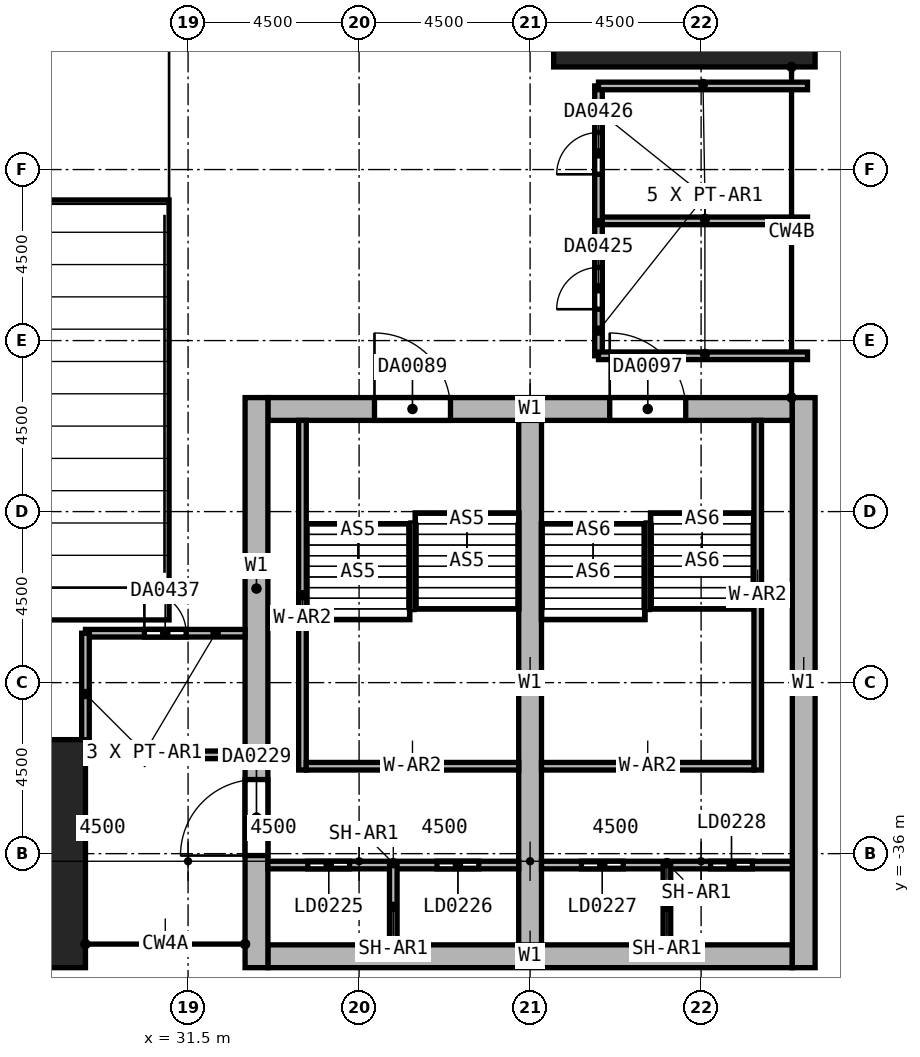
"""IFC4 building model, lengths in metres.
Left out: names, types, materials, properties, quantities, classifications, styles, units other than length and angle.
Written with IfcOpenShell. Run it as: python <this file> out.ifc"""

import sys

from ifc_helpers import new_model, si_unit, direction, frame, frame_2d, origin, origin_2d, place, context, subcontext, project, spatial, rectangle, extrude, element, fill, save


model = new_model("IFC4")
c1 = context("Model", 3, precision=1e-05, world=origin(), true_north=direction((0.0, 1.0)))
c2 = subcontext(c1, "Body", "Model", "MODEL_VIEW")
j1 = project(units=[si_unit("LENGTHUNIT", "METRE"), si_unit("PLANEANGLEUNIT", "RADIAN")], contexts=[c1])
p1 = place(None, origin())
s1 = spatial("IfcSite", under=j1, at=p1, CompositionType="ELEMENT")
p2 = place(p1, origin())
s2 = spatial("IfcBuilding", under=s1, at=p2, CompositionType="ELEMENT")
p3 = place(p2, frame((0.0, 0.0, 31.0)))
s3 = spatial("IfcBuildingStorey", under=s2, at=p3, CompositionType="ELEMENT", Elevation=31.0)
p4 = place(p3, frame((27.0, -36.0, 0.0), z_axis=(0.0, 0.0, 1.0), x_axis=(1.0, 0.0, 0.0)))
e1 = element("IfcColumn", 1, at=p4, inside=s3, PredefinedType="COLUMN", context=c2, shape_type="SweptSolid", body=[
    extrude(rectangle(XDim=3.6, YDim=6.0, at=origin_2d()), origin(), (0.0, 0.0, 1.0), 6.0),
])
p5 = place(p3, frame((44.56, -13.5, 0.0), z_axis=(0.0, 0.0, 1.0), x_axis=(0.0, 1.0, 0.0)))
e2 = element("IfcColumn", 2, at=p5, inside=s3, PredefinedType="COLUMN", context=c2, shape_type="SweptSolid", body=[
    extrude(rectangle(XDim=3.6, YDim=6.88, at=origin_2d()), origin(), (0.0, 0.0, 1.0), 6.0),
])
p6 = place(p3, frame((33.6, -24.3, 0.0), z_axis=(0.0, 0.0, 1.0), x_axis=(1.0, 0.0, 0.0)))
e3 = element("IfcWall", 3, at=p6, inside=s3, PredefinedType="SHEAR", context=c2, shape_type="SweptSolid", body=[
    extrude(rectangle(XDim=13.8, YDim=0.6, at=frame_2d((6.9, 0.0))), origin(), (0.0, 0.0, 1.0), 6.0),
])
p7 = place(p6, frame((2.805, 0.0, 0.0)))
e4 = element("IfcOpeningElement", 4, at=p7, cuts=e3, PredefinedType="OPENING", context=c2, shape_type="SweptSolid", body=[
    extrude(rectangle(XDim=2.0, YDim=2.4, at=frame_2d((1.0, 1.2))), frame((0.0, 0.3, 0.0), z_axis=(0.0, -1.0, 0.0), x_axis=(1.0, 0.0, 0.0)), (0.0, 0.0, 1.0), 0.6),
])
p8 = place(p6, frame((8.995, 0.0, 0.0)))
e5 = element("IfcOpeningElement", 5, at=p8, cuts=e3, PredefinedType="OPENING", context=c2, shape_type="SweptSolid", body=[
    extrude(rectangle(XDim=2.0, YDim=2.4, at=frame_2d((1.0, 1.2))), frame((0.0, 0.3, 0.0), z_axis=(0.0, -1.0, 0.0), x_axis=(1.0, 0.0, 0.0)), (0.0, 0.0, 1.0), 0.6),
])
p9 = place(p3, frame((33.6, -38.7, 0.0), z_axis=(0.0, 0.0, 1.0), x_axis=(1.0, 0.0, 0.0)))
e6 = element("IfcWall", 6, at=p9, inside=s3, PredefinedType="SHEAR", context=c2, shape_type="SweptSolid", body=[
    extrude(rectangle(XDim=13.8, YDim=0.6, at=frame_2d((6.9, 0.0))), origin(), (0.0, 0.0, 1.0), 6.0),
])
p10 = place(p3, frame((33.3, -39.0, 0.0), z_axis=(0.0, 0.0, 1.0), x_axis=(0.0, 1.0, 0.0)))
e7 = element("IfcWall", 7, at=p10, inside=s3, PredefinedType="SHEAR", context=c2, shape_type="SweptSolid", body=[
    extrude(rectangle(XDim=15.0, YDim=0.6, at=frame_2d((7.5, 0.0))), origin(), (0.0, 0.0, 1.0), 6.0),
])
p11 = place(p10, frame((2.95, 0.0, 0.0)))
e8 = element("IfcOpeningElement", 8, at=p11, cuts=e7, PredefinedType="OPENING", context=c2, shape_type="SweptSolid", body=[
    extrude(rectangle(XDim=2.0, YDim=2.4, at=frame_2d((1.0, 1.2))), frame((0.0, 0.3, 0.0), z_axis=(0.0, -1.0, 0.0), x_axis=(1.0, 0.0, 0.0)), (0.0, 0.0, 1.0), 0.6),
])
p12 = place(p3, frame((47.7, -39.0, 0.0), z_axis=(0.0, 0.0, 1.0), x_axis=(0.0, 1.0, 0.0)))
e9 = element("IfcWall", 9, at=p12, inside=s3, PredefinedType="SHEAR", context=c2, shape_type="SweptSolid", body=[
    extrude(rectangle(XDim=15.0, YDim=0.6, at=frame_2d((7.5, 0.0))), origin(), (0.0, 0.0, 1.0), 6.0),
])
p13 = place(p3, frame((40.5, -38.4, 0.0), z_axis=(0.0, 0.0, 1.0), x_axis=(0.0, 1.0, 0.0)))
e10 = element("IfcWall", 10, at=p13, inside=s3, PredefinedType="SHEAR", context=c2, shape_type="SweptSolid", body=[
    extrude(rectangle(XDim=13.8, YDim=0.6, at=frame_2d((6.9, 0.0))), origin(), (0.0, 0.0, 1.0), 6.0),
])
p14 = place(p3, frame((34.51, -33.8, 0.0), z_axis=(0.0, 0.0, 1.0), x_axis=(0.0, 1.0, 0.0)))
e11 = element("IfcWall", 11, at=p14, inside=s3, PredefinedType="SOLIDWALL", context=c2, shape_type="SweptSolid", body=[
    extrude(rectangle(XDim=9.2, YDim=0.2, at=frame_2d((4.6, 0.0))), origin(), (0.0, 0.0, 1.0), 6.0),
])
p15 = place(p3, frame((34.61, -33.7, 0.0), z_axis=(0.0, 0.0, 1.0), x_axis=(1.0, 0.0, 0.0)))
e12 = element("IfcWall", 12, at=p15, inside=s3, PredefinedType="SOLIDWALL", context=c2, shape_type="SweptSolid", body=[
    extrude(rectangle(XDim=5.59, YDim=0.2, at=frame_2d((2.795, 0.0))), origin(), (0.0, 0.0, 1.0), 6.0),
])
p16 = place(p3, frame((46.49, -33.8, 0.0), z_axis=(0.0, 0.0, 1.0), x_axis=(0.0, 1.0, 0.0)))
e13 = element("IfcWall", 13, at=p16, inside=s3, PredefinedType="SOLIDWALL", context=c2, shape_type="SweptSolid", body=[
    extrude(rectangle(XDim=9.2, YDim=0.2, at=frame_2d((4.6, 0.0))), origin(), (0.0, 0.0, 1.0), 6.0),
])
p17 = place(p3, frame((40.8, -33.7, 0.0), z_axis=(0.0, 0.0, 1.0), x_axis=(1.0, 0.0, 0.0)))
e14 = element("IfcWall", 14, at=p17, inside=s3, PredefinedType="SOLIDWALL", context=c2, shape_type="SweptSolid", body=[
    extrude(rectangle(XDim=5.59, YDim=0.2, at=frame_2d((2.795, 0.0))), origin(), (0.0, 0.0, 1.0), 6.0),
])
p18 = place(p3, frame((33.6, -36.3, 0.0), z_axis=(0.0, 0.0, 1.0), x_axis=(1.0, 0.0, 0.0)))
e15 = element("IfcWall", 15, at=p18, inside=s3, PredefinedType="SHEAR", context=c2, shape_type="SweptSolid", body=[
    extrude(rectangle(XDim=6.6, YDim=0.2, at=frame_2d((3.3, 0.0))), origin(), (0.0, 0.0, 1.0), 6.0),
])
p19 = place(p18, frame((1.05, 0.0, 0.0)))
e16 = element("IfcOpeningElement", 16, at=p19, cuts=e15, PredefinedType="OPENING", context=c2, shape_type="SweptSolid", body=[
    extrude(rectangle(XDim=1.1, YDim=2.4, at=frame_2d((0.55, 1.2))), frame((0.0, 0.1, 0.0), z_axis=(0.0, -1.0, 0.0), x_axis=(1.0, 0.0, 0.0)), (0.0, 0.0, 1.0), 0.2),
])
p20 = place(p18, frame((4.45, 0.0, 0.0)))
e17 = element("IfcOpeningElement", 17, at=p20, cuts=e15, PredefinedType="OPENING", context=c2, shape_type="SweptSolid", body=[
    extrude(rectangle(XDim=1.1, YDim=2.4, at=frame_2d((0.55, 1.2))), frame((0.0, 0.1, 0.0), z_axis=(0.0, -1.0, 0.0), x_axis=(1.0, 0.0, 0.0)), (0.0, 0.0, 1.0), 0.2),
])
p21 = place(p3, frame((40.8, -36.3, 0.0), z_axis=(0.0, 0.0, 1.0), x_axis=(1.0, 0.0, 0.0)))
e18 = element("IfcWall", 18, at=p21, inside=s3, PredefinedType="SHEAR", context=c2, shape_type="SweptSolid", body=[
    extrude(rectangle(XDim=6.6, YDim=0.2, at=frame_2d((3.3, 0.0))), origin(), (0.0, 0.0, 1.0), 6.0),
])
p22 = place(p21, frame((1.05, 0.0, 0.0)))
e19 = element("IfcOpeningElement", 19, at=p22, cuts=e18, PredefinedType="OPENING", context=c2, shape_type="SweptSolid", body=[
    extrude(rectangle(XDim=1.1, YDim=2.4, at=frame_2d((0.55, 1.2))), frame((0.0, 0.1, 0.0), z_axis=(0.0, -1.0, 0.0), x_axis=(1.0, 0.0, 0.0)), (0.0, 0.0, 1.0), 0.2),
])
p23 = place(p21, frame((4.45, 0.0, 0.0)))
e20 = element("IfcOpeningElement", 20, at=p23, cuts=e18, PredefinedType="OPENING", context=c2, shape_type="SweptSolid", body=[
    extrude(rectangle(XDim=1.1, YDim=2.4, at=frame_2d((0.55, 1.2))), frame((0.0, 0.1, 0.0), z_axis=(0.0, -1.0, 0.0), x_axis=(1.0, 0.0, 0.0)), (0.0, 0.0, 1.0), 0.2),
])
for number, where, z_axis, x_axis in (
    (21, (36.9, -38.4, 0.0), (0.0, 0.0, 1.0), (0.0, 1.0, 0.0)),
    (22, (44.1, -38.4, 0.0), (0.0, 0.0, 1.0), (0.0, 1.0, 0.0)),
):
    element("IfcWall", number, at=place(p3, frame(where, z_axis=z_axis, x_axis=x_axis)), inside=s3, PredefinedType="SHEAR", context=c2, shape_type="SweptSolid", body=[
        extrude(rectangle(XDim=2.1, YDim=0.2, at=frame_2d((1.05, 0.0))), origin(), (0.0, 0.0, 1.0), 6.0),
    ])
p24 = place(p3, frame((42.3, -22.9, 0.0), z_axis=(0.0, 0.0, 1.0), x_axis=(0.0, 1.0, 0.0)))
e23 = element("IfcWall", 23, at=p24, inside=s3, PredefinedType="PARTITIONING", context=c2, shape_type="SweptSolid", body=[
    extrude(rectangle(XDim=3.55, YDim=0.2, at=frame_2d((1.775, 0.0))), origin(), (0.0, 0.0, 1.0), 5.7),
])
p25 = place(p24, frame((1.225, 0.0, 0.0)))
e24 = element("IfcOpeningElement", 24, at=p25, cuts=e23, PredefinedType="OPENING", context=c2, shape_type="SweptSolid", body=[
    extrude(rectangle(XDim=1.1, YDim=2.4, at=frame_2d((0.55, 1.2))), frame((0.0, 0.1, 0.0), z_axis=(0.0, -1.0, 0.0), x_axis=(1.0, 0.0, 0.0)), (0.0, 0.0, 1.0), 0.2),
])
for number, where, z_axis, x_axis in (
    (25, (42.3, -22.9, 0.0), (0.0, 0.0, 1.0), (1.0, 0.0, 0.0)),
    (26, (42.3, -19.35, 0.0), (0.0, 0.0, 1.0), (1.0, 0.0, 0.0)),
):
    element("IfcWall", number, at=place(p3, frame(where, z_axis=z_axis, x_axis=x_axis)), inside=s3, PredefinedType="PARTITIONING", context=c2, shape_type="SweptSolid", body=[
        extrude(rectangle(XDim=5.5, YDim=0.2, at=frame_2d((2.75, 0.0))), origin(), (0.0, 0.0, 1.0), 5.7),
    ])
p26 = place(p3, frame((42.3, -19.35, 0.0), z_axis=(0.0, 0.0, 1.0), x_axis=(0.0, 1.0, 0.0)))
e27 = element("IfcWall", 27, at=p26, inside=s3, PredefinedType="PARTITIONING", context=c2, shape_type="SweptSolid", body=[
    extrude(rectangle(XDim=3.55, YDim=0.2, at=frame_2d((1.775, 0.0))), origin(), (0.0, 0.0, 1.0), 5.7),
])
p27 = place(p26, frame((1.225, 0.0, 0.0)))
e28 = element("IfcOpeningElement", 28, at=p27, cuts=e27, PredefinedType="OPENING", context=c2, shape_type="SweptSolid", body=[
    extrude(rectangle(XDim=1.1, YDim=2.4, at=frame_2d((0.55, 1.2))), frame((0.0, 0.1, 0.0), z_axis=(0.0, -1.0, 0.0), x_axis=(1.0, 0.0, 0.0)), (0.0, 0.0, 1.0), 0.2),
])
p28 = place(p3, frame((42.3, -15.8, 0.0), z_axis=(0.0, 0.0, 1.0), x_axis=(1.0, 0.0, 0.0)))
e29 = element("IfcWall", 29, at=p28, inside=s3, PredefinedType="PARTITIONING", context=c2, shape_type="SweptSolid", body=[
    extrude(rectangle(XDim=5.5, YDim=0.2, at=frame_2d((2.75, 0.0))), origin(), (0.0, 0.0, 1.0), 5.7),
])
p29 = place(p3, frame((28.8, -30.2, 0.0), z_axis=(0.0, 0.0, 1.0), x_axis=(1.0, 0.0, 0.0)))
e30 = element("IfcWall", 30, at=p29, inside=s3, PredefinedType="PARTITIONING", context=c2, shape_type="SweptSolid", body=[
    extrude(rectangle(XDim=4.2, YDim=0.2, at=frame_2d((2.1, 0.0))), origin(), (0.0, 0.0, 1.0), 5.7),
])
p30 = place(p29, frame((1.55, 0.0, 0.0)))
e31 = element("IfcOpeningElement", 31, at=p30, cuts=e30, PredefinedType="OPENING", context=c2, shape_type="SweptSolid", body=[
    extrude(rectangle(XDim=1.1, YDim=2.4, at=frame_2d((0.55, 1.2))), frame((0.0, 0.1, 0.0), z_axis=(0.0, -1.0, 0.0), x_axis=(1.0, 0.0, 0.0)), (0.0, 0.0, 1.0), 0.2),
])
p31 = place(p3, frame((28.8, -33.4, 0.0), z_axis=(0.0, 0.0, 1.0), x_axis=(0.0, 1.0, 0.0)))
e32 = element("IfcWall", 32, at=p31, inside=s3, PredefinedType="PARTITIONING", context=c2, shape_type="SweptSolid", body=[
    extrude(rectangle(XDim=3.2, YDim=0.2, at=frame_2d((1.6, 0.0))), origin(), (0.0, 0.0, 1.0), 5.7),
])
p32 = place(p3, frame((28.8, -33.4, 0.0), z_axis=(0.0, 0.0, 1.0), x_axis=(1.0, 0.0, 0.0)))
e33 = element("IfcWall", 33, at=p32, inside=s3, PredefinedType="PARTITIONING", context=c2, shape_type="SweptSolid", body=[
    extrude(rectangle(XDim=4.2, YDim=0.2, at=frame_2d((2.1, 0.0))), origin(), (0.0, 0.0, 1.0), 5.7),
])
p33 = place(p7, frame((2.0, 0.0, 0.0), z_axis=(0.0, 0.0, 1.0), x_axis=(-1.0, 0.0, 0.0)))
e34 = element("IfcDoor", 34, at=p33, inside=s3, OperationType="DOUBLE_DOOR_SINGLE_SWING", PredefinedType="DOOR", context=c2, shape_type="SweptSolid", body=[
    extrude(rectangle(XDim=2.0, YDim=2.4, at=frame_2d((1.0, 1.2))), frame((0.0, 0.025, 0.0), z_axis=(0.0, -1.0, 0.0), x_axis=(1.0, 0.0, 0.0)), (0.0, 0.0, 1.0), 0.05),
])
fill(e4, e34)
p34 = place(p8, frame((2.0, 0.0, 0.0), z_axis=(0.0, 0.0, 1.0), x_axis=(-1.0, 0.0, 0.0)))
e35 = element("IfcDoor", 35, at=p34, inside=s3, OperationType="DOUBLE_DOOR_SINGLE_SWING", PredefinedType="DOOR", context=c2, shape_type="SweptSolid", body=[
    extrude(rectangle(XDim=2.0, YDim=2.4, at=frame_2d((1.0, 1.2))), frame((0.0, 0.025, 0.0), z_axis=(0.0, -1.0, 0.0), x_axis=(1.0, 0.0, 0.0)), (0.0, 0.0, 1.0), 0.05),
])
fill(e5, e35)
p35 = place(p19, frame((1.1, 0.0, 0.0), z_axis=(0.0, 0.0, 1.0), x_axis=(-1.0, 0.0, 0.0)))
e36 = element("IfcDoor", 36, at=p35, inside=s3, OperationType="DOUBLE_DOOR_SLIDING", PredefinedType="DOOR", context=c2, shape_type="SweptSolid", body=[
    extrude(rectangle(XDim=1.1, YDim=2.4, at=frame_2d((0.55, 1.2))), frame((0.0, 0.025, 0.0), z_axis=(0.0, -1.0, 0.0), x_axis=(1.0, 0.0, 0.0)), (0.0, 0.0, 1.0), 0.05),
])
fill(e16, e36)
p36 = place(p20, frame((1.1, 0.0, 0.0), z_axis=(0.0, 0.0, 1.0), x_axis=(-1.0, 0.0, 0.0)))
e37 = element("IfcDoor", 37, at=p36, inside=s3, OperationType="DOUBLE_DOOR_SLIDING", PredefinedType="DOOR", context=c2, shape_type="SweptSolid", body=[
    extrude(rectangle(XDim=1.1, YDim=2.4, at=frame_2d((0.55, 1.2))), frame((0.0, 0.025, 0.0), z_axis=(0.0, -1.0, 0.0), x_axis=(1.0, 0.0, 0.0)), (0.0, 0.0, 1.0), 0.05),
])
fill(e17, e37)
p37 = place(p22, frame((1.1, 0.0, 0.0), z_axis=(0.0, 0.0, 1.0), x_axis=(-1.0, 0.0, 0.0)))
e38 = element("IfcDoor", 38, at=p37, inside=s3, OperationType="DOUBLE_DOOR_SLIDING", PredefinedType="DOOR", context=c2, shape_type="SweptSolid", body=[
    extrude(rectangle(XDim=1.1, YDim=2.4, at=frame_2d((0.55, 1.2))), frame((0.0, 0.025, 0.0), z_axis=(0.0, -1.0, 0.0), x_axis=(1.0, 0.0, 0.0)), (0.0, 0.0, 1.0), 0.05),
])
fill(e19, e38)
p38 = place(p23, frame((1.1, 0.0, 0.0), z_axis=(0.0, 0.0, 1.0), x_axis=(-1.0, 0.0, 0.0)))
e39 = element("IfcDoor", 39, at=p38, inside=s3, OperationType="DOUBLE_DOOR_SLIDING", PredefinedType="DOOR", context=c2, shape_type="SweptSolid", body=[
    extrude(rectangle(XDim=1.1, YDim=2.4, at=frame_2d((0.55, 1.2))), frame((0.0, 0.025, 0.0), z_axis=(0.0, -1.0, 0.0), x_axis=(1.0, 0.0, 0.0)), (0.0, 0.0, 1.0), 0.05),
])
fill(e20, e39)
p39 = place(p11, origin())
e40 = element("IfcDoor", 40, at=p39, inside=s3, OperationType="DOUBLE_DOOR_SINGLE_SWING", PredefinedType="DOOR", context=c2, shape_type="SweptSolid", body=[
    extrude(rectangle(XDim=2.0, YDim=2.4, at=frame_2d((1.0, 1.2))), frame((0.0, 0.025, 0.0), z_axis=(0.0, -1.0, 0.0), x_axis=(1.0, 0.0, 0.0)), (0.0, 0.0, 1.0), 0.05),
])
fill(e8, e40)
p40 = place(p25, origin())
e41 = element("IfcDoor", 41, at=p40, inside=s3, OperationType="DOUBLE_DOOR_SINGLE_SWING", PredefinedType="DOOR", context=c2, shape_type="SweptSolid", body=[
    extrude(rectangle(XDim=1.1, YDim=2.4, at=frame_2d((0.55, 1.2))), frame((0.0, 0.025, 0.0), z_axis=(0.0, -1.0, 0.0), x_axis=(1.0, 0.0, 0.0)), (0.0, 0.0, 1.0), 0.05),
])
fill(e24, e41)
p41 = place(p27, origin())
e42 = element("IfcDoor", 42, at=p41, inside=s3, OperationType="DOUBLE_DOOR_SINGLE_SWING", PredefinedType="DOOR", context=c2, shape_type="SweptSolid", body=[
    extrude(rectangle(XDim=1.1, YDim=2.4, at=frame_2d((0.55, 1.2))), frame((0.0, 0.025, 0.0), z_axis=(0.0, -1.0, 0.0), x_axis=(1.0, 0.0, 0.0)), (0.0, 0.0, 1.0), 0.05),
])
fill(e28, e42)
p42 = place(p30, origin())
e43 = element("IfcDoor", 43, at=p42, inside=s3, OperationType="DOUBLE_DOOR_SINGLE_SWING", PredefinedType="DOOR", context=c2, shape_type="SweptSolid", body=[
    extrude(rectangle(XDim=1.1, YDim=2.4, at=frame_2d((0.55, 1.2))), frame((0.0, 0.025, 0.0), z_axis=(0.0, -1.0, 0.0), x_axis=(1.0, 0.0, 0.0)), (0.0, 0.0, 1.0), 0.05),
])
fill(e31, e43)
save(model, sys.argv[1])
